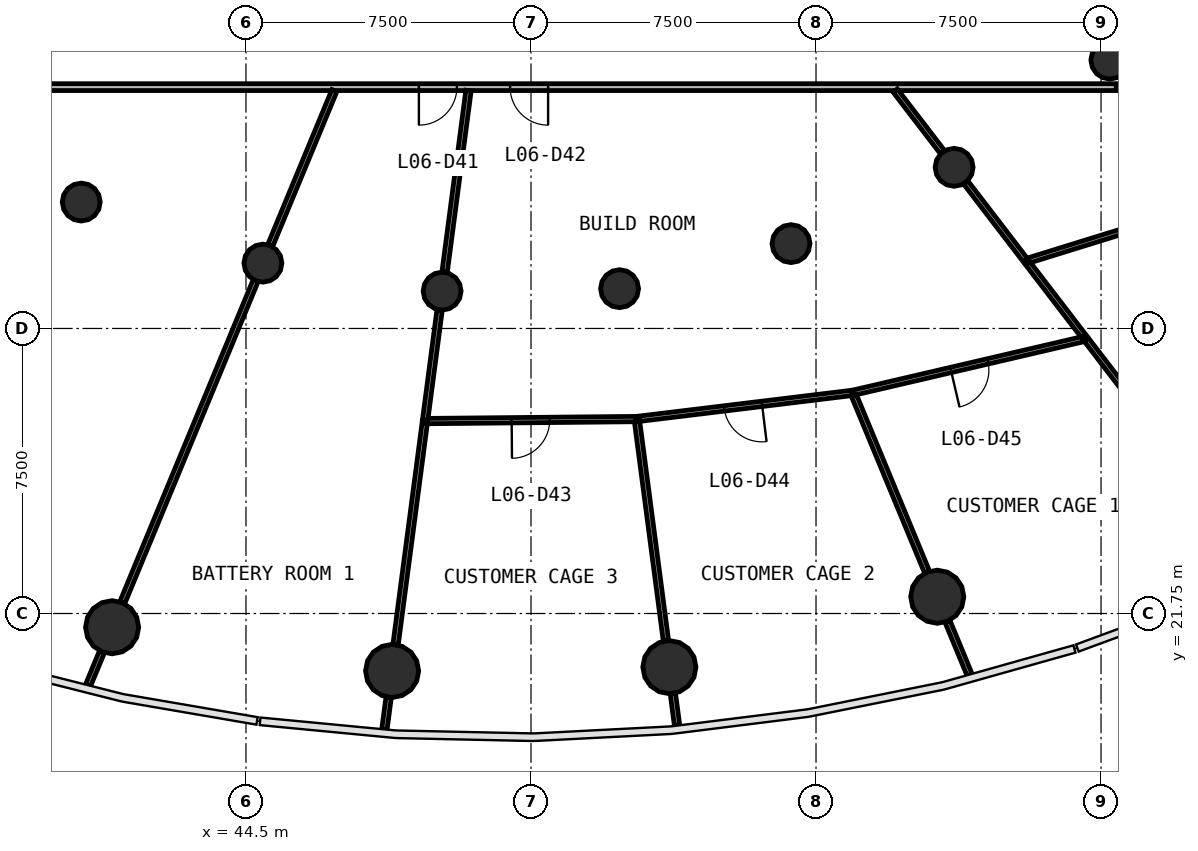
"""IFC4 building model, lengths in metres.
Left out: names, types, materials, properties, quantities, classifications, styles, units other than length and angle.
Written with IfcOpenShell. Run it as: python <this file> out.ifc"""

import sys

from ifc_helpers import new_model, si_unit, direction, frame, frame_2d, origin, origin_2d, place, context, subcontext, project, spatial, rectangle, circle, extrude, source, transform, mapped, element, fill, save


model = new_model("IFC4")
c1 = context("Model", 3, precision=1e-05, world=origin(), true_north=direction((0.0, 1.0)))
c2 = subcontext(c1, "Body", "Model", "MODEL_VIEW")
j1 = project(units=[si_unit("LENGTHUNIT", "METRE"), si_unit("PLANEANGLEUNIT", "RADIAN")], contexts=[c1])
p1 = place(None, origin())
s1 = spatial("IfcSite", under=j1, at=p1, CompositionType="ELEMENT")
p2 = place(p1, origin())
s2 = spatial("IfcBuilding", under=s1, at=p2, CompositionType="ELEMENT")
p3 = place(p2, frame((0.0, 0.0, 27.0)))
s3 = spatial("IfcBuildingStorey", under=s2, at=p3, CompositionType="ELEMENT", Elevation=27.0)
m1 = source(origin(), c2, "Body", "SweptSolid", [
    extrude(circle(Radius=0.7, at=origin_2d()), origin(), (0.0, 0.0, 1.0), 4.4),
])
for number, where, z_axis, x_axis in (
    (1, (40.977, 21.389, 0.0), (0.0, 0.0, 1.0), (1.0, 0.0, 0.0)),
    (2, (48.345, 20.239, 0.0), (0.0, 0.0, 1.0), (1.0, 0.0, 0.0)),
    (3, (55.642, 20.339, 0.0), (0.0, 0.0, 1.0), (1.0, 0.0, 0.0)),
    (4, (62.69, 22.191, 0.0), (0.0, 0.0, 1.0), (1.0, 0.0, 0.0)),
):
    element("IfcColumn", number, at=place(p3, frame(where, z_axis=z_axis, x_axis=x_axis)), inside=s3, PredefinedType="COLUMN", context=c2, shape_type="MappedRepresentation", body=[
        mapped(m1, transform((0.0, 0.0, 0.0), scale=1.0)),
    ])
m2 = source(origin(), c2, "Body", "SweptSolid", [
    extrude(circle(Radius=0.5, at=origin_2d()), origin(), (0.0, 0.0, 1.0), 4.4),
])
for number, where, z_axis, x_axis in (
    (5, (40.165, 32.576, 0.0), (0.0, 0.0, 1.0), (1.0, 0.0, 0.0)),
    (6, (44.945, 30.969, 0.0), (0.0, 0.0, 1.0), (1.0, 0.0, 0.0)),
    (7, (49.661, 30.233, 0.0), (0.0, 0.0, 1.0), (1.0, 0.0, 0.0)),
    (8, (54.331, 30.297, 0.0), (0.0, 0.0, 1.0), (1.0, 0.0, 0.0)),
    (9, (58.842, 31.482, 0.0), (0.0, 0.0, 1.0), (1.0, 0.0, 0.0)),
    (10, (63.134, 33.49, 0.0), (0.0, 0.0, 1.0), (1.0, 0.0, 0.0)),
    (11, (67.232, 36.312, 0.0), (0.0, 0.0, 1.0), (1.0, 0.0, 0.0)),
):
    element("IfcColumn", number, at=place(p3, frame(where, z_axis=z_axis, x_axis=x_axis)), inside=s3, PredefinedType="COLUMN", context=c2, shape_type="MappedRepresentation", body=[
        mapped(m2, transform((0.0, 0.0, 0.0), scale=1.0)),
    ])
p4 = place(p3, frame((67.4, 35.6, 0.0), z_axis=(0.0, 0.0, 1.0), x_axis=(-1.0, 0.0, 0.0)))
e12 = element("IfcWall", 12, at=p4, inside=s3, PredefinedType="PARTITIONING", context=c2, shape_type="SweptSolid", body=[
    extrude(rectangle(XDim=30.8, YDim=0.18, at=frame_2d((15.4, 0.0))), origin(), (0.0, 0.0, 1.0), 3.05),
])
p5 = place(p4, frame((17.35, 0.0, 0.0)))
e13 = element("IfcOpeningElement", 13, at=p5, cuts=e12, PredefinedType="OPENING", context=c2, shape_type="SweptSolid", body=[
    extrude(rectangle(XDim=1.0, YDim=2.1, at=frame_2d((0.5, 1.05))), frame((0.0, 0.1, 0.0), z_axis=(0.0, -1.0, 0.0), x_axis=(1.0, 0.0, 0.0)), (0.0, 0.0, 1.0), 0.2),
])
p6 = place(p4, frame((14.95, 0.0, 0.0)))
e14 = element("IfcOpeningElement", 14, at=p6, cuts=e12, PredefinedType="OPENING", context=c2, shape_type="SweptSolid", body=[
    extrude(rectangle(XDim=1.0, YDim=2.1, at=frame_2d((0.5, 1.05))), frame((0.0, 0.1, 0.0), z_axis=(0.0, -1.0, 0.0), x_axis=(1.0, 0.0, 0.0)), (0.0, 0.0, 1.0), 0.2),
])
p7 = place(p3, frame((44.752, 30.502, 0.0), z_axis=(0.0, 0.0, 1.0), x_axis=(-0.382672728165, -0.923883966264, 0.0)))
e15 = element("IfcWall", 15, at=p7, inside=s3, PredefinedType="PARTITIONING", context=c2, shape_type="SweptSolid", body=[
    extrude(rectangle(XDim=9.16, YDim=0.14, at=frame_2d((4.58, 0.0))), origin(), (0.0, 0.0, 1.0), 3.05),
])
p8 = place(p3, frame((65.03, 31.02, 0.0), z_axis=(0.0, 0.0, 1.0), x_axis=(0.955222723313, 0.295887730172, 0.0)))
e16 = element("IfcWall", 16, at=p8, inside=s3, PredefinedType="PARTITIONING", context=c2, shape_type="SweptSolid", body=[
    extrude(rectangle(XDim=6.787, YDim=0.14, at=frame_2d((3.393, 0.0))), origin(), (0.0, 0.0, 1.0), 3.05),
])
p9 = place(p3, frame((66.592, 28.984, 0.0), z_axis=(0.0, 0.0, 1.0), x_axis=(-0.973907326405, -0.226946071954, 0.0)))
e17 = element("IfcWall", 17, at=p9, inside=s3, PredefinedType="PARTITIONING", context=c2, shape_type="SweptSolid", body=[
    extrude(rectangle(XDim=6.288, YDim=0.14, at=frame_2d((3.144, 0.0))), origin(), (0.0, 0.0, 1.0), 3.05),
])
p10 = place(p9, frame((2.638, 0.0, 0.0)))
e18 = element("IfcOpeningElement", 18, at=p10, cuts=e17, PredefinedType="OPENING", context=c2, shape_type="SweptSolid", body=[
    extrude(rectangle(XDim=1.0, YDim=2.1, at=frame_2d((0.5, 1.05))), frame((0.0, 0.08, 0.0), z_axis=(0.0, -1.0, 0.0), x_axis=(1.0, 0.0, 0.0)), (0.0, 0.0, 1.0), 0.16),
])
p11 = place(p3, frame((49.211, 26.813, 0.0), z_axis=(0.0, 0.0, 1.0), x_axis=(-0.130536559076, -0.991443496496, 0.0)))
e19 = element("IfcWall", 19, at=p11, inside=s3, PredefinedType="PARTITIONING", context=c2, shape_type="SweptSolid", body=[
    extrude(rectangle(XDim=5.927, YDim=0.14, at=frame_2d((2.963, 0.0))), origin(), (0.0, 0.0, 1.0), 3.05),
])
p12 = place(p3, frame((54.782, 26.866, 0.0), z_axis=(0.0, 0.0, 1.0), x_axis=(0.130542585571, -0.99144270301, 0.0)))
e20 = element("IfcWall", 20, at=p12, inside=s3, PredefinedType="PARTITIONING", context=c2, shape_type="SweptSolid", body=[
    extrude(rectangle(XDim=5.88, YDim=0.14, at=frame_2d((2.94, 0.0))), origin(), (0.0, 0.0, 1.0), 3.05),
])
p13 = place(p3, frame((60.438, 27.553, 0.0), z_axis=(0.0, 0.0, 1.0), x_axis=(-0.992716024963, -0.12047777298, 0.0)))
e21 = element("IfcWall", 21, at=p13, inside=s3, PredefinedType="PARTITIONING", context=c2, shape_type="SweptSolid", body=[
    extrude(rectangle(XDim=5.627, YDim=0.14, at=frame_2d((2.814, 0.0))), origin(), (0.0, 0.0, 1.0), 3.05),
])
p14 = place(p13, frame((2.377, 0.0, 0.0)))
e22 = element("IfcOpeningElement", 22, at=p14, cuts=e21, PredefinedType="OPENING", context=c2, shape_type="SweptSolid", body=[
    extrude(rectangle(XDim=1.0, YDim=2.1, at=frame_2d((0.5, 1.05))), frame((0.0, 0.08, 0.0), z_axis=(0.0, -1.0, 0.0), x_axis=(1.0, 0.0, 0.0)), (0.0, 0.0, 1.0), 0.16),
])
p15 = place(p3, frame((54.752, 26.866, 0.0), z_axis=(0.0, 0.0, 1.0), x_axis=(-0.999953808147, -0.009611533326, 0.0)))
e23 = element("IfcWall", 23, at=p15, inside=s3, PredefinedType="PARTITIONING", context=c2, shape_type="SweptSolid", body=[
    extrude(rectangle(XDim=5.512, YDim=0.14, at=frame_2d((2.756, 0.0))), origin(), (0.0, 0.0, 1.0), 3.05),
])
p16 = place(p15, frame((2.262, 0.0, 0.0)))
e24 = element("IfcOpeningElement", 24, at=p16, cuts=e23, PredefinedType="OPENING", context=c2, shape_type="SweptSolid", body=[
    extrude(rectangle(XDim=1.0, YDim=2.1, at=frame_2d((0.5, 1.05))), frame((0.0, 0.08, 0.0), z_axis=(0.0, -1.0, 0.0), x_axis=(1.0, 0.0, 0.0)), (0.0, 0.0, 1.0), 0.16),
])
p17 = place(p3, frame((60.495, 27.491, 0.0), z_axis=(0.0, 0.0, 1.0), x_axis=(0.382674650858, -0.923883169882, 0.0)))
e25 = element("IfcWall", 25, at=p17, inside=s3, PredefinedType="PARTITIONING", context=c2, shape_type="SweptSolid", body=[
    extrude(rectangle(XDim=5.031, YDim=0.14, at=frame_2d((2.516, 0.0))), origin(), (0.0, 0.0, 1.0), 3.05),
])
p18 = place(p3, frame((50.356, 35.51, 0.0), z_axis=(0.0, 0.0, 1.0), x_axis=(-0.130523979823, -0.991445152639, 0.0)))
e26 = element("IfcWall", 26, at=p18, inside=s3, PredefinedType="PARTITIONING", context=c2, shape_type="SweptSolid", body=[
    extrude(rectangle(XDim=4.818, YDim=0.14, at=frame_2d((2.409, 0.0))), origin(), (0.0, 0.0, 1.0), 3.05),
])
p19 = place(p3, frame((46.826, 35.51, 0.0), z_axis=(0.0, 0.0, 1.0), x_axis=(-0.382672831764, -0.923883923353, 0.0)))
e27 = element("IfcWall", 27, at=p19, inside=s3, PredefinedType="PARTITIONING", context=c2, shape_type="SweptSolid", body=[
    extrude(rectangle(XDim=4.41, YDim=0.14, at=frame_2d((2.205, 0.0))), origin(), (0.0, 0.0, 1.0), 3.05),
])
p20 = place(p3, frame((66.61, 28.96, 0.0), z_axis=(0.0, 0.0, 1.0), x_axis=(0.608747750124, -0.793363836282, 0.0)))
e28 = element("IfcWall", 28, at=p20, inside=s3, PredefinedType="PARTITIONING", context=c2, shape_type="SweptSolid", body=[
    extrude(rectangle(XDim=3.873, YDim=0.14, at=frame_2d((1.937, 0.0))), origin(), (0.0, 0.0, 1.0), 3.05),
])
p21 = place(p3, frame((49.595, 29.733, 0.0), z_axis=(0.0, 0.0, 1.0), x_axis=(-0.130484843212, -0.991450304197, 0.0)))
e29 = element("IfcWall", 29, at=p21, inside=s3, PredefinedType="PARTITIONING", context=c2, shape_type="SweptSolid", body=[
    extrude(rectangle(XDim=2.915, YDim=0.14, at=frame_2d((1.458, 0.0))), origin(), (0.0, 0.0, 1.0), 3.05),
])
p22 = place(p3, frame((63.441, 33.09, 0.0), z_axis=(0.0, 0.0, 1.0), x_axis=(0.608791083389, -0.793330584805, 0.0)))
e30 = element("IfcWall", 30, at=p22, inside=s3, PredefinedType="PARTITIONING", context=c2, shape_type="SweptSolid", body=[
    extrude(rectangle(XDim=2.58, YDim=0.14, at=frame_2d((1.29, 0.0))), origin(), (0.0, 0.0, 1.0), 3.05),
])
p23 = place(p3, frame((65.075, 30.96, 0.0), z_axis=(0.0, 0.0, 1.0), x_axis=(0.608732944488, -0.79337519642, 0.0)))
e31 = element("IfcWall", 31, at=p23, inside=s3, PredefinedType="PARTITIONING", context=c2, shape_type="SweptSolid", body=[
    extrude(rectangle(XDim=2.414, YDim=0.14, at=frame_2d((1.207, 0.0))), origin(), (0.0, 0.0, 1.0), 3.05),
])
p24 = place(p3, frame((61.584, 35.51, 0.0), z_axis=(0.0, 0.0, 1.0), x_axis=(0.608727763541, -0.793379171578, 0.0)))
e32 = element("IfcWall", 32, at=p24, inside=s3, PredefinedType="PARTITIONING", context=c2, shape_type="SweptSolid", body=[
    extrude(rectangle(XDim=2.042, YDim=0.14, at=frame_2d((1.021, 0.0))), origin(), (0.0, 0.0, 1.0), 3.05),
])
p25 = place(p3, frame((62.96, 21.54, 0.0), z_axis=(0.0, 0.0, 1.0), x_axis=(0.382521566015, -0.923946563138, 0.0)))
e33 = element("IfcWall", 33, at=p25, inside=s3, PredefinedType="PARTITIONING", context=c2, shape_type="SweptSolid", body=[
    extrude(rectangle(XDim=1.524, YDim=0.14, at=frame_2d((0.762, 0.0))), origin(), (0.0, 0.0, 1.0), 3.05),
])
p26 = place(p3, frame((40.708, 20.737, 0.0), z_axis=(0.0, 0.0, 1.0), x_axis=(-0.382814514464, -0.923825225633, 0.0)))
e34 = element("IfcWall", 34, at=p26, inside=s3, PredefinedType="PARTITIONING", context=c2, shape_type="SweptSolid", body=[
    extrude(rectangle(XDim=0.963, YDim=0.14, at=frame_2d((0.481, 0.0))), origin(), (0.0, 0.0, 1.0), 3.05),
])
p27 = place(p3, frame((48.253, 19.54, 0.0), z_axis=(0.0, 0.0, 1.0), x_axis=(-0.1304619789, -0.991453313102, 0.0)))
e35 = element("IfcWall", 35, at=p27, inside=s3, PredefinedType="PARTITIONING", context=c2, shape_type="SweptSolid", body=[
    extrude(rectangle(XDim=0.846, YDim=0.14, at=frame_2d((0.423, 0.0))), origin(), (0.0, 0.0, 1.0), 3.05),
])
p28 = place(p3, frame((55.734, 19.64, 0.0), z_axis=(0.0, 0.0, 1.0), x_axis=(0.130342122338, -0.991469077251, 0.0)))
e36 = element("IfcWall", 36, at=p28, inside=s3, PredefinedType="PARTITIONING", context=c2, shape_type="SweptSolid", body=[
    extrude(rectangle(XDim=0.843, YDim=0.14, at=frame_2d((0.421, 0.0))), origin(), (0.0, 0.0, 1.0), 3.05),
])
m3 = source(origin(), c2, "Body", "SweptSolid", [
    extrude(rectangle(XDim=1.0, YDim=2.1, at=frame_2d((0.5, 1.05))), frame((0.0, 0.025, 0.0), z_axis=(0.0, -1.0, 0.0), x_axis=(1.0, 0.0, 0.0)), (0.0, 0.0, 1.0), 0.05),
])
p29 = place(p5, origin())
e37 = element("IfcDoor", 37, at=p29, inside=s3, OperationType="SINGLE_SWING_RIGHT", PredefinedType="DOOR", context=c2, shape_type="MappedRepresentation", body=[
    mapped(m3, transform((0.0, 0.0, 0.0), scale=1.0)),
])
fill(e13, e37)
p30 = place(p6, origin())
e38 = element("IfcDoor", 38, at=p30, inside=s3, OperationType="SINGLE_SWING_LEFT", PredefinedType="DOOR", context=c2, shape_type="MappedRepresentation", body=[
    mapped(m3, transform((0.0, 0.0, 0.0), scale=1.0)),
])
fill(e14, e38)
p31 = place(p16, origin())
e39 = element("IfcDoor", 39, at=p31, inside=s3, OperationType="SINGLE_SWING_RIGHT", PredefinedType="DOOR", context=c2, shape_type="MappedRepresentation", body=[
    mapped(m3, transform((0.0, 0.0, 0.0), scale=1.0)),
])
fill(e24, e39)
p32 = place(p14, origin())
e40 = element("IfcDoor", 40, at=p32, inside=s3, OperationType="SINGLE_SWING_LEFT", PredefinedType="DOOR", context=c2, shape_type="MappedRepresentation", body=[
    mapped(m3, transform((0.0, 0.0, 0.0), scale=1.0)),
])
fill(e22, e40)
p33 = place(p10, origin())
e41 = element("IfcDoor", 41, at=p33, inside=s3, OperationType="SINGLE_SWING_RIGHT", PredefinedType="DOOR", context=c2, shape_type="MappedRepresentation", body=[
    mapped(m3, transform((0.0, 0.0, 0.0), scale=1.0)),
])
fill(e18, e41)
save(model, sys.argv[1])
